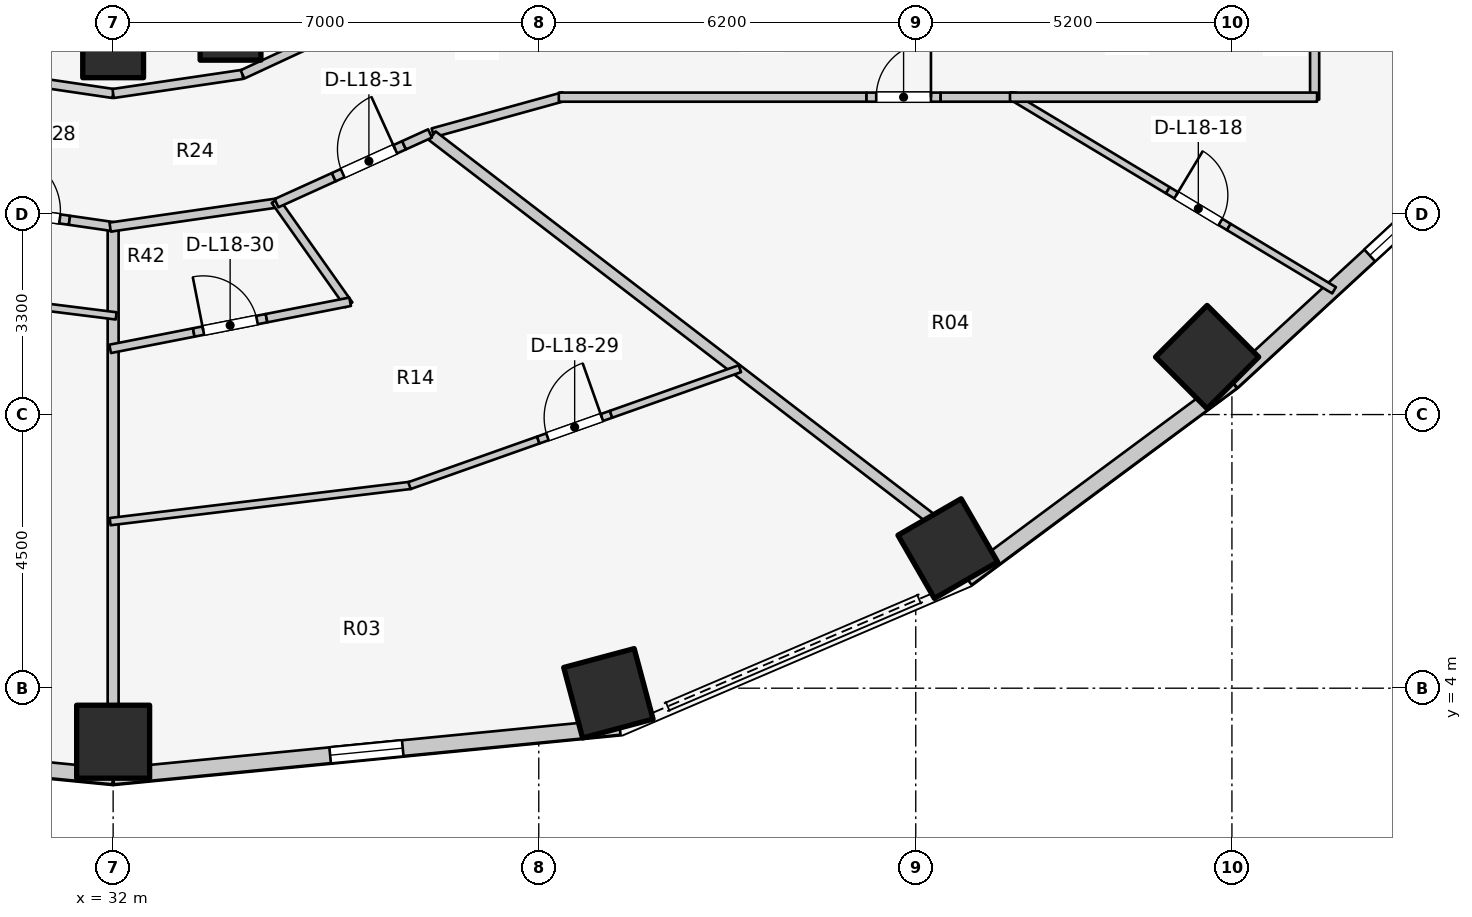
"""IFC4 building model, lengths in metres.
Left out: names, types, materials, properties, quantities, classifications, styles, units other than length and angle.
Written with IfcOpenShell. Run it as: python <this file> out.ifc"""

import sys

from ifc_helpers import new_model, si_unit, direction, frame, frame_2d, origin, origin_2d, place, context, subcontext, project, spatial, rectangle, extrude, element, fill, save


model = new_model("IFC4")
c1 = context("Model", 3, precision=1e-05, world=origin(), true_north=direction((0.0, 1.0)))
c2 = subcontext(c1, "Body", "Model", "MODEL_VIEW")
j1 = project(units=[si_unit("LENGTHUNIT", "METRE"), si_unit("PLANEANGLEUNIT", "RADIAN")], contexts=[c1])
p1 = place(None, origin())
s1 = spatial("IfcSite", under=j1, at=p1, CompositionType="ELEMENT")
p2 = place(p1, origin())
s2 = spatial("IfcBuilding", under=s1, at=p2, CompositionType="ELEMENT")
p3 = place(p2, frame((0.0, 0.0, 61.7)))
s3 = spatial("IfcBuildingStorey", under=s2, at=p3, CompositionType="ELEMENT", Elevation=61.7)
p4 = place(p3, frame((32.0, 14.54, 0.0), z_axis=(0.0, 0.0, 1.0), x_axis=(1.0, 0.0, 0.0)))
e1 = element("IfcColumn", 1, at=p4, inside=s3, PredefinedType="COLUMN", context=c2, shape_type="SweptSolid", body=[
    extrude(rectangle(XDim=1.0, YDim=1.0, at=origin_2d()), origin(), (0.0, 0.0, 1.0), 3.1),
])
p5 = place(p3, frame((32.0, 3.12, 0.0), z_axis=(0.0, 0.0, 1.0), x_axis=(0.0, -1.0, 0.0)))
e2 = element("IfcColumn", 2, at=p5, inside=s3, PredefinedType="COLUMN", context=c2, shape_type="SweptSolid", body=[
    extrude(rectangle(XDim=1.2, YDim=1.2, at=origin_2d()), origin(), (0.0, 0.0, 1.0), 3.1),
])
p6 = place(p3, frame((33.931, 14.828, 0.0), z_axis=(0.0, 0.0, 1.0), x_axis=(1.0, 0.0, 0.0)))
e3 = element("IfcColumn", 3, at=p6, inside=s3, PredefinedType="COLUMN", context=c2, shape_type="SweptSolid", body=[
    extrude(rectangle(XDim=1.0, YDim=1.0, at=origin_2d()), origin(), (0.0, 0.0, 1.0), 3.1),
])
for number, where, z_axis, x_axis in (
    (4, (40.145, 3.916, 0.0), (0.0, 0.0, 1.0), (0.259, -0.966, 0.0)),
    (5, (45.727, 6.296, 0.0), (0.0, 0.0, 1.0), (0.5, -0.866, 0.0)),
    (6, (49.992, 9.446, 0.0), (0.0, 0.0, 1.0), (0.707, -0.707, 0.0)),
):
    element("IfcColumn", number, at=place(p3, frame(where, z_axis=z_axis, x_axis=x_axis)), inside=s3, PredefinedType="COLUMN", context=c2, shape_type="SweptSolid", body=[
        extrude(rectangle(XDim=1.2, YDim=1.2, at=origin_2d()), origin(), (0.0, 0.0, 1.0), 3.1),
    ])
p7 = place(p3, frame((23.668, 3.364, 0.0), z_axis=(0.0, 0.0, 1.0), x_axis=(0.995247718352, -0.097375454379, 0.0)))
e7 = element("IfcWall", 7, at=p7, inside=s3, PredefinedType="STANDARD", context=c2, shape_type="SweptSolid", body=[
    extrude(rectangle(XDim=8.372, YDim=0.26, at=frame_2d((4.186, 0.0))), origin(), (0.0, 0.0, 1.0), 1.22),
])
p8 = place(p7, frame((3.586, 0.0, 0.15)))
e8 = element("IfcOpeningElement", 8, at=p8, cuts=e7, PredefinedType="OPENING", context=c2, shape_type="SweptSolid", body=[
    extrude(rectangle(XDim=1.2, YDim=0.9, at=frame_2d((0.6, 0.45))), frame((0.0, 0.14, 0.0), z_axis=(0.0, -1.0, 0.0), x_axis=(1.0, 0.0, 0.0)), (0.0, 0.0, 1.0), 0.28),
])
p9 = place(p3, frame((32.0, 2.549, 0.0), z_axis=(0.0, 0.0, 1.0), x_axis=(0.995247718352, 0.097375454379, 0.0)))
e9 = element("IfcWall", 9, at=p9, inside=s3, PredefinedType="STANDARD", context=c2, shape_type="SweptSolid", body=[
    extrude(rectangle(XDim=8.372, YDim=0.26, at=frame_2d((4.186, 0.0))), origin(), (0.0, 0.0, 1.0), 1.22),
])
p10 = place(p9, frame((3.586, 0.0, 0.15)))
e10 = element("IfcOpeningElement", 10, at=p10, cuts=e9, PredefinedType="OPENING", context=c2, shape_type="SweptSolid", body=[
    extrude(rectangle(XDim=1.2, YDim=0.9, at=frame_2d((0.6, 0.45))), frame((0.0, 0.14, 0.0), z_axis=(0.0, -1.0, 0.0), x_axis=(1.0, 0.0, 0.0)), (0.0, 0.0, 1.0), 0.28),
])
p11 = place(p3, frame((46.042, 5.803, 0.0), z_axis=(0.0, 0.0, 1.0), x_axis=(0.803477531792, 0.595335078679, 0.0)))
e11 = element("IfcWall", 11, at=p11, inside=s3, PredefinedType="STANDARD", context=c2, shape_type="SweptSolid", body=[
    extrude(rectangle(XDim=5.43, YDim=0.26, at=frame_2d((2.715, 0.0))), origin(), (0.0, 0.0, 1.0), 1.22),
])
p12 = place(p3, frame((50.405, 9.035, 0.0), z_axis=(0.0, 0.0, 1.0), x_axis=(0.735655109293, 0.67735630223, 0.0)))
e12 = element("IfcWall", 12, at=p12, inside=s3, PredefinedType="STANDARD", context=c2, shape_type="SweptSolid", body=[
    extrude(rectangle(XDim=5.151, YDim=0.26, at=frame_2d((2.575, 0.0))), origin(), (0.0, 0.0, 1.0), 1.22),
])
p13 = place(p12, frame((3.074, 0.0, 0.15)))
e13 = element("IfcOpeningElement", 13, at=p13, cuts=e12, PredefinedType="OPENING", context=c2, shape_type="SweptSolid", body=[
    extrude(rectangle(XDim=1.2, YDim=0.9, at=frame_2d((0.6, 0.45))), frame((0.0, 0.14, 0.0), z_axis=(0.0, -1.0, 0.0), x_axis=(1.0, 0.0, 0.0)), (0.0, 0.0, 1.0), 0.28),
])
for number, where, z_axis, x_axis in (
    (14, (29.873, 14.094, 0.0), (0.0, 0.0, 1.0), (0.989, -0.146, 0.0)),
    (15, (32.0, 13.78, 0.0), (0.0, 0.0, 1.0), (0.989, 0.146, 0.0)),
):
    element("IfcWall", number, at=place(p3, frame(where, z_axis=z_axis, x_axis=x_axis)), inside=s3, PredefinedType="PARTITIONING", context=c2, shape_type="SweptSolid", body=[
        extrude(rectangle(XDim=2.151, YDim=0.15, at=frame_2d((1.075, 0.0))), origin(), (0.0, 0.0, 1.0), 1.22),
    ])
p14 = place(p3, frame((34.127, 14.094, 0.0), z_axis=(0.0, 0.0, 1.0), x_axis=(0.906943449489, 0.421252393975, 0.0)))
e16 = element("IfcWall", 16, at=p14, inside=s3, PredefinedType="PARTITIONING", context=c2, shape_type="SweptSolid", body=[
    extrude(rectangle(XDim=2.186, YDim=0.15, at=frame_2d((1.093, 0.0))), origin(), (0.0, 0.0, 1.0), 1.22),
])
p15 = place(p3, frame((51.76, 13.68, 0.0), z_axis=(0.0, 0.0, 1.0), x_axis=(0.0, 1.0, 0.0)))
e17 = element("IfcWall", 17, at=p15, inside=s3, PredefinedType="PARTITIONING", context=c2, shape_type="SweptSolid", body=[
    extrude(rectangle(XDim=3.148, YDim=0.15, at=frame_2d((1.574, 0.0))), origin(), (0.0, 0.0, 1.0), 2.575),
])
p16 = place(p3, frame((46.757, 13.746, 0.0), z_axis=(0.0, 0.0, 1.0), x_axis=(0.85690055002, -0.515481762408, 0.0)))
e18 = element("IfcWall", 18, at=p16, inside=s3, PredefinedType="MOVABLE", context=c2, shape_type="SweptSolid", body=[
    extrude(rectangle(XDim=3.021, YDim=0.12, at=frame_2d((1.511, 0.0))), origin(), (0.0, 0.0, 1.0), 1.22),
])
p17 = place(p3, frame((49.346, 12.188, 0.0), z_axis=(0.0, 0.0, 1.0), x_axis=(0.856958544896, -0.515385343534, 0.0)))
e19 = element("IfcWall", 19, at=p17, inside=s3, PredefinedType="MOVABLE", context=c2, shape_type="SweptSolid", body=[
    extrude(rectangle(XDim=1.17, YDim=0.12, at=frame_2d((0.585, 0.0))), origin(), (0.0, 0.0, 1.0), 2.11),
])
p18 = place(p17, frame((0.16, 0.0, 0.0)))
e20 = element("IfcOpeningElement", 20, at=p18, cuts=e19, PredefinedType="OPENING", context=c2, shape_type="SweptSolid", body=[
    extrude(rectangle(XDim=0.85, YDim=2.05, at=frame_2d((0.425, 1.025))), frame((0.0, 0.07, 0.0), z_axis=(0.0, -1.0, 0.0), x_axis=(1.0, 0.0, 0.0)), (0.0, 0.0, 1.0), 0.14),
])
p19 = place(p3, frame((50.349, 11.585, 0.0), z_axis=(0.0, 0.0, 1.0), x_axis=(0.856884567555, -0.515508329599, 0.0)))
e21 = element("IfcWall", 21, at=p19, inside=s3, PredefinedType="MOVABLE", context=c2, shape_type="SweptSolid", body=[
    extrude(rectangle(XDim=2.02, YDim=0.12, at=frame_2d((1.01, 0.0))), origin(), (0.0, 0.0, 1.0), 2.575),
])
p20 = place(p3, frame((37.258, 13.133, 0.0), z_axis=(0.0, 0.0, 1.0), x_axis=(0.963833843713, 0.266503886865, 0.0)))
e22 = element("IfcWall", 22, at=p20, inside=s3, PredefinedType="PARTITIONING", context=c2, shape_type="SweptSolid", body=[
    extrude(rectangle(XDim=2.232, YDim=0.15, at=frame_2d((1.116, 0.0))), origin(), (0.0, 0.0, 1.0), 1.22),
])
p21 = place(p3, frame((39.33, 13.72, 0.0), z_axis=(0.0, 0.0, 1.0), x_axis=(1.0, 0.0, 0.0)))
e23 = element("IfcWall", 23, at=p21, inside=s3, PredefinedType="PARTITIONING", context=c2, shape_type="SweptSolid", body=[
    extrude(rectangle(XDim=5.06, YDim=0.15, at=frame_2d((2.53, 0.0))), origin(), (0.0, 0.0, 1.0), 1.22),
])
p22 = place(p3, frame((44.39, 13.72, 0.0), z_axis=(0.0, 0.0, 1.0), x_axis=(1.0, 0.0, 0.0)))
e24 = element("IfcWall", 24, at=p22, inside=s3, PredefinedType="PARTITIONING", context=c2, shape_type="SweptSolid", body=[
    extrude(rectangle(XDim=1.22, YDim=0.15, at=frame_2d((0.61, 0.0))), origin(), (0.0, 0.0, 1.0), 2.575),
])
p23 = place(p22, frame((0.16, 0.0, 0.0)))
e25 = element("IfcOpeningElement", 25, at=p23, cuts=e24, PredefinedType="OPENING", context=c2, shape_type="SweptSolid", body=[
    extrude(rectangle(XDim=0.9, YDim=2.1, at=frame_2d((0.45, 1.05))), frame((0.0, 0.085, 0.0), z_axis=(0.0, -1.0, 0.0), x_axis=(1.0, 0.0, 0.0)), (0.0, 0.0, 1.0), 0.17),
])
p24 = place(p3, frame((45.61, 13.72, 0.0), z_axis=(0.0, 0.0, 1.0), x_axis=(1.0, 0.0, 0.0)))
e26 = element("IfcWall", 26, at=p24, inside=s3, PredefinedType="PARTITIONING", context=c2, shape_type="SweptSolid", body=[
    extrude(rectangle(XDim=1.24, YDim=0.15, at=frame_2d((0.62, 0.0))), origin(), (0.0, 0.0, 1.0), 2.575),
])
p25 = place(p3, frame((46.75, 13.72, 0.0), z_axis=(0.0, 0.0, 1.0), x_axis=(1.0, 0.0, 0.0)))
e27 = element("IfcWall", 27, at=p25, inside=s3, PredefinedType="PARTITIONING", context=c2, shape_type="SweptSolid", body=[
    extrude(rectangle(XDim=5.05, YDim=0.15, at=frame_2d((2.525, 0.0))), origin(), (0.0, 0.0, 1.0), 1.22),
])
p26 = place(p3, frame((32.0, 11.535, 0.0), z_axis=(0.0, 0.0, 1.0), x_axis=(0.0, -1.0, 0.0)))
e28 = element("IfcWall", 28, at=p26, inside=s3, PredefinedType="PARTITIONING", context=c2, shape_type="SweptSolid", body=[
    extrude(rectangle(XDim=7.835, YDim=0.18, at=frame_2d((3.917, 0.0))), origin(), (0.0, 0.0, 1.0), 1.22),
])
p27 = place(p3, frame((37.249, 13.085, 0.0), z_axis=(0.0, 0.0, 1.0), x_axis=(0.793181014702, -0.608985942298, 0.0)))
e29 = element("IfcWall", 29, at=p27, inside=s3, PredefinedType="PARTITIONING", context=c2, shape_type="SweptSolid", body=[
    extrude(rectangle(XDim=10.324, YDim=0.18, at=frame_2d((5.162, 0.0))), origin(), (0.0, 0.0, 1.0), 1.22),
])
p28 = place(p3, frame((30.792, 10.28, 0.0), z_axis=(0.0, 0.0, 1.0), x_axis=(0.992251181548, -0.124248109512, 0.0)))
e30 = element("IfcWall", 30, at=p28, inside=s3, PredefinedType="MOVABLE", context=c2, shape_type="SweptSolid", body=[
    extrude(rectangle(XDim=1.267, YDim=0.12, at=frame_2d((0.634, 0.0))), origin(), (0.0, 0.0, 1.0), 1.22),
])
p29 = place(p3, frame((30.024, 11.876, 0.0), z_axis=(0.0, 0.0, 1.0), x_axis=(0.98974859422, -0.142820587591, 0.0)))
e31 = element("IfcWall", 31, at=p29, inside=s3, PredefinedType="PARTITIONING", context=c2, shape_type="SweptSolid", body=[
    extrude(rectangle(XDim=1.27, YDim=0.15, at=frame_2d((0.635, 0.0))), origin(), (0.0, 0.0, 1.0), 2.575),
])
p30 = place(p29, frame((0.16, 0.0, 0.0)))
e32 = element("IfcOpeningElement", 32, at=p30, cuts=e31, PredefinedType="OPENING", context=c2, shape_type="SweptSolid", body=[
    extrude(rectangle(XDim=0.95, YDim=2.1, at=frame_2d((0.475, 1.05))), frame((0.0, 0.085, 0.0), z_axis=(0.0, -1.0, 0.0), x_axis=(1.0, 0.0, 0.0)), (0.0, 0.0, 1.0), 0.17),
])
p31 = place(p3, frame((31.281, 11.695, 0.0), z_axis=(0.0, 0.0, 1.0), x_axis=(0.98974875873, -0.142819447526, 0.0)))
e33 = element("IfcWall", 33, at=p31, inside=s3, PredefinedType="PARTITIONING", context=c2, shape_type="SweptSolid", body=[
    extrude(rectangle(XDim=0.733, YDim=0.15, at=frame_2d((0.367, 0.0))), origin(), (0.0, 0.0, 1.0), 1.22),
])
p32 = place(p3, frame((31.95, 6.739, 0.0), z_axis=(0.0, 0.0, 1.0), x_axis=(0.992797021108, 0.11980849252, 0.0)))
e34 = element("IfcWall", 34, at=p32, inside=s3, PredefinedType="MOVABLE", context=c2, shape_type="SweptSolid", body=[
    extrude(rectangle(XDim=4.978, YDim=0.12, at=frame_2d((2.489, 0.0))), origin(), (0.0, 0.0, 1.0), 1.22),
])
p33 = place(p3, frame((36.874, 7.331, 0.0), z_axis=(0.0, 0.0, 1.0), x_axis=(0.942721221588, 0.333581621747, 0.0)))
e35 = element("IfcWall", 35, at=p33, inside=s3, PredefinedType="MOVABLE", context=c2, shape_type="SweptSolid", body=[
    extrude(rectangle(XDim=2.247, YDim=0.12, at=frame_2d((1.124, 0.0))), origin(), (0.0, 0.0, 1.0), 1.22),
])
p34 = place(p3, frame((38.992, 8.081, 0.0), z_axis=(0.0, 0.0, 1.0), x_axis=(0.942677624698, 0.333704803523, 0.0)))
e36 = element("IfcWall", 36, at=p34, inside=s3, PredefinedType="MOVABLE", context=c2, shape_type="SweptSolid", body=[
    extrude(rectangle(XDim=1.27, YDim=0.12, at=frame_2d((0.635, 0.0))), origin(), (0.0, 0.0, 1.0), 2.575),
])
p35 = place(p34, frame((0.16, 0.0, 0.0)))
e37 = element("IfcOpeningElement", 37, at=p35, cuts=e36, PredefinedType="OPENING", context=c2, shape_type="SweptSolid", body=[
    extrude(rectangle(XDim=0.95, YDim=2.1, at=frame_2d((0.475, 1.05))), frame((0.0, 0.07, 0.0), z_axis=(0.0, -1.0, 0.0), x_axis=(1.0, 0.0, 0.0)), (0.0, 0.0, 1.0), 0.14),
])
p36 = place(p3, frame((40.189, 8.505, 0.0), z_axis=(0.0, 0.0, 1.0), x_axis=(0.942687047554, 0.333678183845, 0.0)))
e38 = element("IfcWall", 38, at=p36, inside=s3, PredefinedType="MOVABLE", context=c2, shape_type="SweptSolid", body=[
    extrude(rectangle(XDim=2.247, YDim=0.12, at=frame_2d((1.124, 0.0))), origin(), (0.0, 0.0, 1.0), 1.22),
])
p37 = place(p3, frame((31.95, 11.583, 0.0), z_axis=(0.0, 0.0, 1.0), x_axis=(0.989761784218, 0.142729150844, 0.0)))
e39 = element("IfcWall", 39, at=p37, inside=s3, PredefinedType="PARTITIONING", context=c2, shape_type="SweptSolid", body=[
    extrude(rectangle(XDim=2.822, YDim=0.15, at=frame_2d((1.411, 0.0))), origin(), (0.0, 0.0, 1.0), 1.22),
])
p38 = place(p3, frame((34.665, 12.02, 0.0), z_axis=(0.0, 0.0, 1.0), x_axis=(0.577139575342, -0.816645523207, 0.0)))
e40 = element("IfcWall", 40, at=p38, inside=s3, PredefinedType="PLUMBINGWALL", context=c2, shape_type="SweptSolid", body=[
    extrude(rectangle(XDim=2.1, YDim=0.14, at=frame_2d((1.05, 0.0))), origin(), (0.0, 0.0, 1.0), 2.575),
])
p39 = place(p3, frame((31.951, 9.58, 0.0), z_axis=(0.0, 0.0, 1.0), x_axis=(0.981284705137, 0.192562528712, 0.0)))
e41 = element("IfcWall", 41, at=p39, inside=s3, PredefinedType="PLUMBINGWALL", context=c2, shape_type="SweptSolid", body=[
    extrude(rectangle(XDim=1.401, YDim=0.14, at=frame_2d((0.7, 0.0))), origin(), (0.0, 0.0, 1.0), 1.22),
])
p40 = place(p3, frame((33.326, 9.85, 0.0), z_axis=(0.0, 0.0, 1.0), x_axis=(0.981252199958, 0.192728098829, 0.0)))
e42 = element("IfcWall", 42, at=p40, inside=s3, PredefinedType="PLUMBINGWALL", context=c2, shape_type="SweptSolid", body=[
    extrude(rectangle(XDim=1.22, YDim=0.14, at=frame_2d((0.61, 0.0))), origin(), (0.0, 0.0, 1.0), 2.575),
])
p41 = place(p40, frame((0.16, 0.0, 0.0)))
e43 = element("IfcOpeningElement", 43, at=p41, cuts=e42, PredefinedType="OPENING", context=c2, shape_type="SweptSolid", body=[
    extrude(rectangle(XDim=0.9, YDim=2.1, at=frame_2d((0.45, 1.05))), frame((0.0, 0.08, 0.0), z_axis=(0.0, -1.0, 0.0), x_axis=(1.0, 0.0, 0.0)), (0.0, 0.0, 1.0), 0.16),
])
p42 = place(p3, frame((34.523, 10.085, 0.0), z_axis=(0.0, 0.0, 1.0), x_axis=(0.981284705137, 0.192562528712, 0.0)))
e44 = element("IfcWall", 44, at=p42, inside=s3, PredefinedType="PLUMBINGWALL", context=c2, shape_type="SweptSolid", body=[
    extrude(rectangle(XDim=1.401, YDim=0.14, at=frame_2d((0.7, 0.0))), origin(), (0.0, 0.0, 1.0), 1.22),
])
p43 = place(p3, frame((34.687, 11.977, 0.0), z_axis=(0.0, 0.0, 1.0), x_axis=(0.910657491524, 0.413162114831, 0.0)))
e45 = element("IfcWall", 45, at=p43, inside=s3, PredefinedType="PARTITIONING", context=c2, shape_type="SweptSolid", body=[
    extrude(rectangle(XDim=1.033, YDim=0.15, at=frame_2d((0.517, 0.0))), origin(), (0.0, 0.0, 1.0), 1.22),
])
p44 = place(p3, frame((35.628, 12.404, 0.0), z_axis=(0.0, 0.0, 1.0), x_axis=(0.910491529429, 0.413527719553, 0.0)))
e46 = element("IfcWall", 46, at=p44, inside=s3, PredefinedType="PARTITIONING", context=c2, shape_type="SweptSolid", body=[
    extrude(rectangle(XDim=1.27, YDim=0.15, at=frame_2d((0.635, 0.0))), origin(), (0.0, 0.0, 1.0), 2.16),
])
p45 = place(p44, frame((0.16, 0.0, 0.0)))
e47 = element("IfcOpeningElement", 47, at=p45, cuts=e46, PredefinedType="OPENING", context=c2, shape_type="SweptSolid", body=[
    extrude(rectangle(XDim=0.95, YDim=2.1, at=frame_2d((0.475, 1.05))), frame((0.0, 0.085, 0.0), z_axis=(0.0, -1.0, 0.0), x_axis=(1.0, 0.0, 0.0)), (0.0, 0.0, 1.0), 0.17),
])
p46 = place(p3, frame((36.785, 12.929, 0.0), z_axis=(0.0, 0.0, 1.0), x_axis=(0.910580557663, 0.413331644091, 0.0)))
e48 = element("IfcWall", 48, at=p46, inside=s3, PredefinedType="PARTITIONING", context=c2, shape_type="SweptSolid", body=[
    extrude(rectangle(XDim=0.469, YDim=0.15, at=frame_2d((0.234, 0.0))), origin(), (0.0, 0.0, 1.0), 2.575),
])
p47 = place(p10, origin())
e49 = element("IfcWindow", 49, at=p47, inside=s3, PartitioningType="SINGLE_PANEL", PredefinedType="WINDOW", context=c2, shape_type="SweptSolid", body=[
    extrude(rectangle(XDim=1.2, YDim=0.9, at=frame_2d((0.6, 0.45))), frame((0.0, 0.03, 0.0), z_axis=(0.0, -1.0, 0.0), x_axis=(1.0, 0.0, 0.0)), (0.0, 0.0, 1.0), 0.06),
])
fill(e10, e49)
p48 = place(p13, origin())
e50 = element("IfcWindow", 50, at=p48, inside=s3, PartitioningType="SINGLE_PANEL", PredefinedType="WINDOW", context=c2, shape_type="SweptSolid", body=[
    extrude(rectangle(XDim=1.2, YDim=0.9, at=frame_2d((0.6, 0.45))), frame((0.0, 0.03, 0.0), z_axis=(0.0, -1.0, 0.0), x_axis=(1.0, 0.0, 0.0)), (0.0, 0.0, 1.0), 0.06),
])
fill(e13, e50)
p49 = place(p18, origin())
e51 = element("IfcDoor", 51, at=p49, inside=s3, OperationType="SINGLE_SWING_LEFT", PredefinedType="DOOR", context=c2, shape_type="SweptSolid", body=[
    extrude(rectangle(XDim=0.85, YDim=2.05, at=frame_2d((0.425, 1.025))), frame((0.0, 0.025, 0.0), z_axis=(0.0, -1.0, 0.0), x_axis=(1.0, 0.0, 0.0)), (0.0, 0.0, 1.0), 0.05),
])
fill(e20, e51)
p50 = place(p23, origin())
e52 = element("IfcDoor", 52, at=p50, inside=s3, OperationType="SINGLE_SWING_RIGHT", PredefinedType="DOOR", context=c2, shape_type="SweptSolid", body=[
    extrude(rectangle(XDim=0.9, YDim=2.1, at=frame_2d((0.45, 1.05))), frame((0.0, 0.025, 0.0), z_axis=(0.0, -1.0, 0.0), x_axis=(1.0, 0.0, 0.0)), (0.0, 0.0, 1.0), 0.05),
])
fill(e25, e52)
p51 = place(p30, origin())
e53 = element("IfcDoor", 53, at=p51, inside=s3, OperationType="SINGLE_SWING_LEFT", PredefinedType="DOOR", context=c2, shape_type="SweptSolid", body=[
    extrude(rectangle(XDim=0.95, YDim=2.1, at=frame_2d((0.475, 1.05))), frame((0.0, 0.025, 0.0), z_axis=(0.0, -1.0, 0.0), x_axis=(1.0, 0.0, 0.0)), (0.0, 0.0, 1.0), 0.05),
])
fill(e32, e53)
p52 = place(p35, origin())
e54 = element("IfcDoor", 54, at=p52, inside=s3, OperationType="SINGLE_SWING_RIGHT", PredefinedType="DOOR", context=c2, shape_type="SweptSolid", body=[
    extrude(rectangle(XDim=0.95, YDim=2.1, at=frame_2d((0.475, 1.05))), frame((0.0, 0.025, 0.0), z_axis=(0.0, -1.0, 0.0), x_axis=(1.0, 0.0, 0.0)), (0.0, 0.0, 1.0), 0.05),
])
fill(e37, e54)
p53 = place(p41, origin())
e55 = element("IfcDoor", 55, at=p53, inside=s3, OperationType="SINGLE_SWING_LEFT", PredefinedType="DOOR", context=c2, shape_type="SweptSolid", body=[
    extrude(rectangle(XDim=0.9, YDim=2.1, at=frame_2d((0.45, 1.05))), frame((0.0, 0.025, 0.0), z_axis=(0.0, -1.0, 0.0), x_axis=(1.0, 0.0, 0.0)), (0.0, 0.0, 1.0), 0.05),
])
fill(e43, e55)
p54 = place(p45, origin())
e56 = element("IfcDoor", 56, at=p54, inside=s3, OperationType="SINGLE_SWING_RIGHT", PredefinedType="DOOR", context=c2, shape_type="SweptSolid", body=[
    extrude(rectangle(XDim=0.95, YDim=2.1, at=frame_2d((0.475, 1.05))), frame((0.0, 0.025, 0.0), z_axis=(0.0, -1.0, 0.0), x_axis=(1.0, 0.0, 0.0)), (0.0, 0.0, 1.0), 0.05),
])
fill(e47, e56)
save(model, sys.argv[1])
